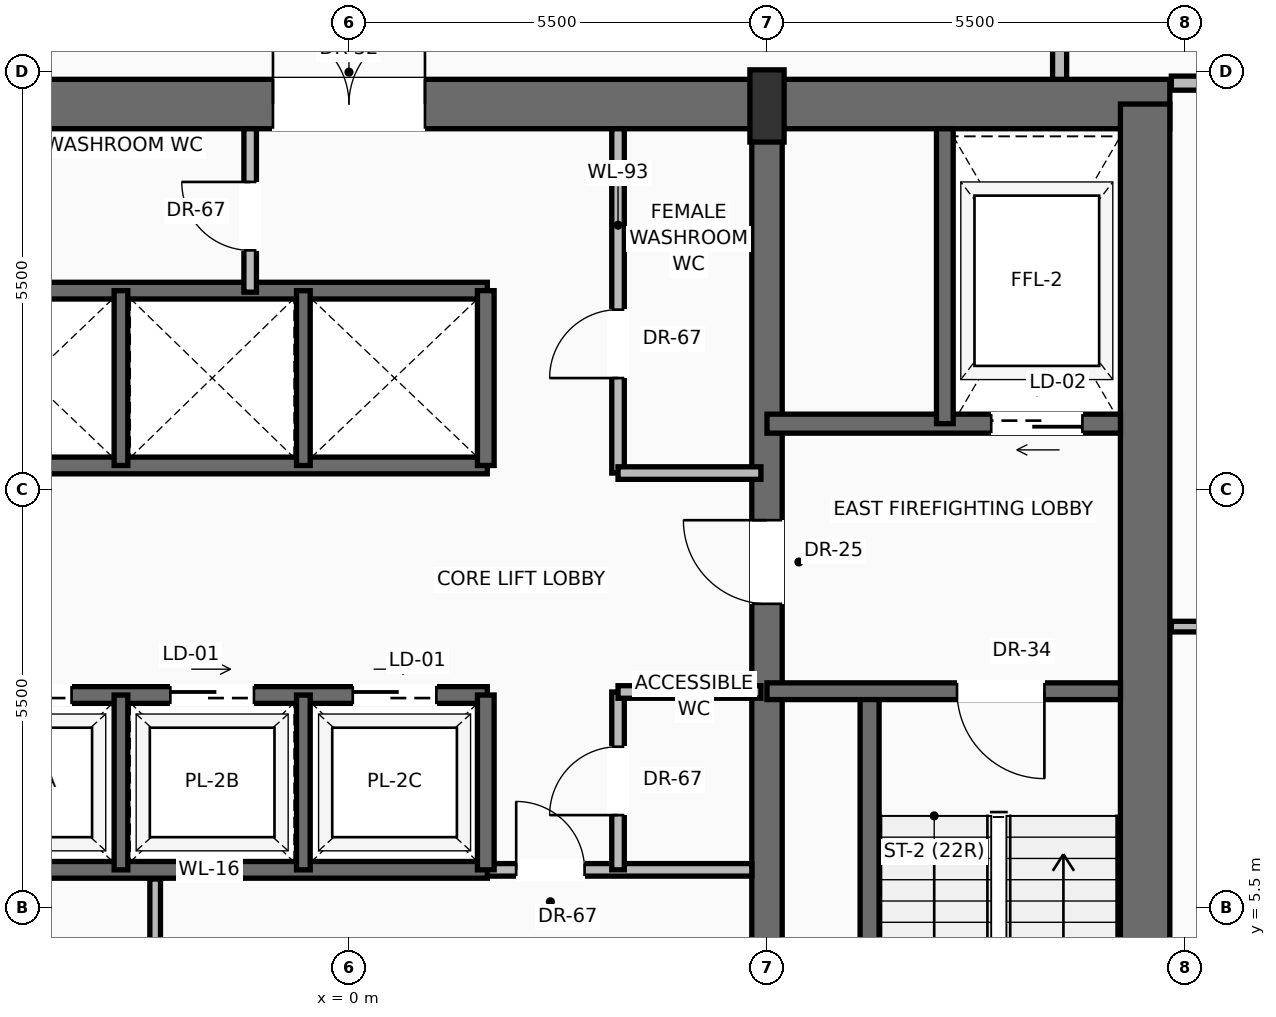
"""IFC4 building model, lengths in metres.
Left out: names, types, materials, properties, quantities, classifications, styles, units other than length and angle.
Written with IfcOpenShell. Run it as: python <this file> out.ifc"""

import sys

from ifc_helpers import new_model, si_unit, direction, frame, frame_2d, origin, origin_2d, place, context, subcontext, project, spatial, rectangle, extrude, source, transform, mapped, element, fill, save


model = new_model("IFC4")
c1 = context("Model", 3, precision=1e-05, world=origin(), true_north=direction((0.0, 1.0)))
c2 = subcontext(c1, "Body", "Model", "MODEL_VIEW")
j1 = project(units=[si_unit("LENGTHUNIT", "METRE"), si_unit("PLANEANGLEUNIT", "RADIAN")], contexts=[c1])
p1 = place(None, origin())
s1 = spatial("IfcSite", under=j1, at=p1, CompositionType="ELEMENT")
p2 = place(p1, origin())
s2 = spatial("IfcBuilding", under=s1, at=p2, CompositionType="ELEMENT")
p3 = place(p2, frame((0.0, 0.0, 158.9)))
s3 = spatial("IfcBuildingStorey", under=s2, at=p3, CompositionType="ELEMENT", Elevation=158.9)
p4 = place(p3, frame((-10.8, 16.075, 0.0), z_axis=(0.0, 0.0, 1.0), x_axis=(1.0, 0.0, 0.0)))
e1 = element("IfcWall", 1, at=p4, inside=s3, PredefinedType="SHEAR", context=c2, shape_type="SweptSolid", body=[
    extrude(rectangle(XDim=21.6, YDim=0.65, at=frame_2d((10.8, 0.0))), origin(), (0.0, 0.0, 1.0), 3.47),
])
p5 = place(p4, frame((3.37, 0.0, 0.0)))
e2 = element("IfcOpeningElement", 2, at=p5, cuts=e1, PredefinedType="OPENING", context=c2, shape_type="SweptSolid", body=[
    extrude(rectangle(XDim=1.3, YDim=2.3, at=frame_2d((0.65, 1.15))), frame((0.0, 0.335, 0.0), z_axis=(0.0, -1.0, 0.0), x_axis=(1.0, 0.0, 0.0)), (0.0, 0.0, 1.0), 0.67),
])
p6 = place(p4, frame((9.8, 0.0, 0.0)))
e3 = element("IfcOpeningElement", 3, at=p6, cuts=e1, PredefinedType="OPENING", context=c2, shape_type="SweptSolid", body=[
    extrude(rectangle(XDim=2.0, YDim=2.4, at=frame_2d((1.0, 1.2))), frame((0.0, 0.335, 0.0), z_axis=(0.0, -1.0, 0.0), x_axis=(1.0, 0.0, 0.0)), (0.0, 0.0, 1.0), 0.67),
])
p7 = place(p3, frame((10.475, 0.525, 0.0), z_axis=(0.0, 0.0, 1.0), x_axis=(0.0, 1.0, 0.0)))
e4 = element("IfcWall", 4, at=p7, inside=s3, PredefinedType="SHEAR", context=c2, shape_type="SweptSolid", body=[
    extrude(rectangle(XDim=15.55, YDim=0.65, at=frame_2d((7.775, 0.0))), origin(), (0.0, 0.0, 1.0), 3.47),
])
p8 = place(p3, frame((5.5, 0.525, 0.0), z_axis=(0.0, 0.0, 1.0), x_axis=(0.0, 1.0, 0.0)))
e5 = element("IfcWall", 5, at=p8, inside=s3, PredefinedType="SHEAR", context=c2, shape_type="SweptSolid", body=[
    extrude(rectangle(XDim=15.55, YDim=0.4, at=frame_2d((7.775, 0.0))), origin(), (0.0, 0.0, 1.0), 3.47),
])
p9 = place(p8, frame((8.975, 0.0, 0.0)))
e6 = element("IfcOpeningElement", 6, at=p9, cuts=e5, PredefinedType="OPENING", context=c2, shape_type="SweptSolid", body=[
    extrude(rectangle(XDim=1.1, YDim=2.2, at=frame_2d((0.55, 1.1))), frame((0.0, 0.21, 0.0), z_axis=(0.0, -1.0, 0.0), x_axis=(1.0, 0.0, 0.0)), (0.0, 0.0, 1.0), 0.42),
])
m1 = source(origin(), c2, "Body", "SweptSolid", [
    extrude(rectangle(XDim=0.45, YDim=0.95, at=origin_2d()), origin(), (0.0, 0.0, 1.0), 3.7),
])
p10 = place(p3, frame((5.5, 16.05, 0.0), z_axis=(0.0, 0.0, 1.0), x_axis=(1.0, 0.0, 0.0)))
e7 = element("IfcColumn", 7, at=p10, inside=s3, PredefinedType="PILASTER", context=c2, shape_type="MappedRepresentation", body=[
    mapped(m1, transform((0.0, 0.0, 0.0), scale=1.0)),
])
p11 = place(p3, frame((6.85, 0.85, 0.0), z_axis=(0.0, 0.0, 1.0), x_axis=(0.0, 1.0, 0.0)))
e8 = element("IfcWall", 8, at=p11, inside=s3, PredefinedType="SOLIDWALL", context=c2, shape_type="SweptSolid", body=[
    extrude(rectangle(XDim=7.5, YDim=0.25, at=frame_2d((3.75, 0.0))), origin(), (0.0, 0.0, 1.0), 3.47),
])
p12 = place(p3, frame((10.15, 8.35, 0.0), z_axis=(0.0, 0.0, 1.0), x_axis=(-1.0, 0.0, 0.0)))
e9 = element("IfcWall", 9, at=p12, inside=s3, PredefinedType="SOLIDWALL", context=c2, shape_type="SweptSolid", body=[
    extrude(rectangle(XDim=4.65, YDim=0.22, at=frame_2d((2.325, 0.0))), origin(), (0.0, 0.0, 1.0), 3.47),
])
p13 = place(p12, frame((1.0, 0.0, 0.0)))
e10 = element("IfcOpeningElement", 10, at=p13, cuts=e9, PredefinedType="OPENING", context=c2, shape_type="SweptSolid", body=[
    extrude(rectangle(XDim=1.15, YDim=2.2, at=frame_2d((0.575, 1.1))), frame((0.0, 0.12, 0.0), z_axis=(0.0, -1.0, 0.0), x_axis=(1.0, 0.0, 0.0)), (0.0, 0.0, 1.0), 0.24),
])
p14 = place(p3, frame((10.15, 11.87, 0.0), z_axis=(0.0, 0.0, 1.0), x_axis=(-1.0, 0.0, 0.0)))
e11 = element("IfcWall", 11, at=p14, inside=s3, PredefinedType="SOLIDWALL", context=c2, shape_type="SweptSolid", body=[
    extrude(rectangle(XDim=4.65, YDim=0.25, at=frame_2d((2.325, 0.0))), origin(), (0.0, 0.0, 1.0), 3.47),
])
p15 = place(p14, frame((0.5, 0.0, 0.0)))
e12 = element("IfcOpeningElement", 12, at=p15, cuts=e11, PredefinedType="OPENING", context=c2, shape_type="SweptSolid", body=[
    extrude(rectangle(XDim=1.2, YDim=2.25, at=frame_2d((0.6, 1.125))), frame((0.0, 0.135, 0.0), z_axis=(0.0, -1.0, 0.0), x_axis=(1.0, 0.0, 0.0)), (0.0, 0.0, 1.0), 0.27),
])
p16 = place(p3, frame((7.84, 11.87, 0.0), z_axis=(0.0, 0.0, 1.0), x_axis=(0.0, 1.0, 0.0)))
e13 = element("IfcWall", 13, at=p16, inside=s3, PredefinedType="SOLIDWALL", context=c2, shape_type="SweptSolid", body=[
    extrude(rectangle(XDim=3.88, YDim=0.22, at=frame_2d((1.94, 0.0))), origin(), (0.0, 0.0, 1.0), 3.47),
])
p17 = place(p3, frame((1.82, 6.0, 0.0), z_axis=(0.0, 0.0, 1.0), x_axis=(1.0, 0.0, 0.0)))
e14 = element("IfcWall", 14, at=p17, inside=s3, PredefinedType="PARTITIONING", context=c2, shape_type="SweptSolid", body=[
    extrude(rectangle(XDim=3.48, YDim=0.165, at=frame_2d((1.74, 0.0))), origin(), (0.0, 0.0, 1.0), 3.462),
])
p18 = place(p17, frame((0.38, 0.0, 0.0)))
e15 = element("IfcOpeningElement", 15, at=p18, cuts=e14, PredefinedType="OPENING", context=c2, shape_type="SweptSolid", body=[
    extrude(rectangle(XDim=0.9, YDim=2.1, at=frame_2d((0.45, 1.05))), frame((0.0, 0.093, 0.0), z_axis=(0.0, -1.0, 0.0), x_axis=(1.0, 0.0, 0.0)), (0.0, 0.0, 1.0), 0.185),
])
p19 = place(p3, frame((-2.55, 0.85, 0.0), z_axis=(0.0, 0.0, 1.0), x_axis=(0.0, 1.0, 0.0)))
e16 = element("IfcWall", 16, at=p19, inside=s3, PredefinedType="PARTITIONING", context=c2, shape_type="SweptSolid", body=[
    extrude(rectangle(XDim=5.03, YDim=0.14, at=frame_2d((2.515, 0.0))), origin(), (0.0, 0.0, 1.0), 3.462),
])
p20 = place(p19, frame((2.1, 0.0, 0.0)))
e17 = element("IfcOpeningElement", 17, at=p20, cuts=e16, PredefinedType="OPENING", context=c2, shape_type="SweptSolid", body=[
    extrude(rectangle(XDim=0.9, YDim=2.1, at=frame_2d((0.45, 1.05))), frame((0.0, 0.08, 0.0), z_axis=(0.0, -1.0, 0.0), x_axis=(1.0, 0.0, 0.0)), (0.0, 0.0, 1.0), 0.16),
])
p21 = place(p3, frame((3.54, 6.0, 0.0), z_axis=(0.0, 0.0, 1.0), x_axis=(0.0, 1.0, 0.0)))
e18 = element("IfcWall", 18, at=p21, inside=s3, PredefinedType="PARTITIONING", context=c2, shape_type="SweptSolid", body=[
    extrude(rectangle(XDim=2.34, YDim=0.165, at=frame_2d((1.17, 0.0))), origin(), (0.0, 0.0, 1.0), 3.462),
])
p22 = place(p21, frame((0.72, 0.0, 0.0)))
e19 = element("IfcOpeningElement", 19, at=p22, cuts=e18, PredefinedType="OPENING", context=c2, shape_type="SweptSolid", body=[
    extrude(rectangle(XDim=0.9, YDim=2.1, at=frame_2d((0.45, 1.05))), frame((0.0, 0.093, 0.0), z_axis=(0.0, -1.0, 0.0), x_axis=(1.0, 0.0, 0.0)), (0.0, 0.0, 1.0), 0.185),
])
p23 = place(p3, frame((3.54, 8.34, 0.0), z_axis=(0.0, 0.0, 1.0), x_axis=(1.0, 0.0, 0.0)))
e20 = element("IfcWall", 20, at=p23, inside=s3, PredefinedType="PARTITIONING", context=c2, shape_type="SweptSolid", body=[
    extrude(rectangle(XDim=1.88, YDim=0.165, at=frame_2d((0.94, 0.0))), origin(), (0.0, 0.0, 1.0), 3.462),
])
p24 = place(p3, frame((-5.5, 6.0, 0.0), z_axis=(0.0, 0.0, 1.0), x_axis=(1.0, 0.0, 0.0)))
e21 = element("IfcWall", 21, at=p24, inside=s3, PredefinedType="SOLIDWALL", context=c2, shape_type="SweptSolid", body=[
    extrude(rectangle(XDim=7.32, YDim=0.22, at=frame_2d((3.66, 0.0))), origin(), (0.0, 0.0, 1.0), 3.47),
])
p25 = place(p3, frame((-5.5, 8.3, 0.0), z_axis=(0.0, 0.0, 1.0), x_axis=(1.0, 0.0, 0.0)))
e22 = element("IfcWall", 22, at=p25, inside=s3, PredefinedType="SOLIDWALL", context=c2, shape_type="SweptSolid", body=[
    extrude(rectangle(XDim=7.32, YDim=0.22, at=frame_2d((3.66, 0.0))), origin(), (0.0, 0.0, 1.0), 3.47),
])
p26 = place(p25, frame((0.75, 0.0, 0.0)))
e23 = element("IfcOpeningElement", 23, at=p26, cuts=e22, PredefinedType="OPENING", context=c2, shape_type="SweptSolid", body=[
    extrude(rectangle(XDim=1.1, YDim=2.2, at=frame_2d((0.55, 1.1))), frame((0.0, 0.12, 0.0), z_axis=(0.0, -1.0, 0.0), x_axis=(1.0, 0.0, 0.0)), (0.0, 0.0, 1.0), 0.24),
])
p27 = place(p25, frame((3.15, 0.0, 0.0)))
e24 = element("IfcOpeningElement", 24, at=p27, cuts=e22, PredefinedType="OPENING", context=c2, shape_type="SweptSolid", body=[
    extrude(rectangle(XDim=1.1, YDim=2.2, at=frame_2d((0.55, 1.1))), frame((0.0, 0.12, 0.0), z_axis=(0.0, -1.0, 0.0), x_axis=(1.0, 0.0, 0.0)), (0.0, 0.0, 1.0), 0.24),
])
p28 = place(p25, frame((5.55, 0.0, 0.0)))
e25 = element("IfcOpeningElement", 25, at=p28, cuts=e22, PredefinedType="OPENING", context=c2, shape_type="SweptSolid", body=[
    extrude(rectangle(XDim=1.1, YDim=2.2, at=frame_2d((0.55, 1.1))), frame((0.0, 0.12, 0.0), z_axis=(0.0, -1.0, 0.0), x_axis=(1.0, 0.0, 0.0)), (0.0, 0.0, 1.0), 0.24),
])
p29 = place(p3, frame((1.8, 6.0, 0.0), z_axis=(0.0, 0.0, 1.0), x_axis=(0.0, 1.0, 0.0)))
e26 = element("IfcWall", 26, at=p29, inside=s3, PredefinedType="SOLIDWALL", context=c2, shape_type="SweptSolid", body=[
    extrude(rectangle(XDim=2.3, YDim=0.22, at=frame_2d((1.15, 0.0))), origin(), (0.0, 0.0, 1.0), 3.47),
])
for number, where, z_axis, x_axis in (
    (27, (-3.0, 6.0, 0.0), (0.0, 0.0, 1.0), (0.0, 1.0, 0.0)),
    (28, (-0.6, 6.0, 0.0), (0.0, 0.0, 1.0), (0.0, 1.0, 0.0)),
):
    element("IfcWall", number, at=place(p3, frame(where, z_axis=z_axis, x_axis=x_axis)), inside=s3, PredefinedType="SOLIDWALL", context=c2, shape_type="SweptSolid", body=[
        extrude(rectangle(XDim=2.3, YDim=0.18, at=frame_2d((1.15, 0.0))), origin(), (0.0, 0.0, 1.0), 3.47),
    ])
for number, where, z_axis, x_axis in (
    (29, (-5.5, 11.32, 0.0), (0.0, 0.0, 1.0), (1.0, 0.0, 0.0)),
    (30, (-5.5, 13.62, 0.0), (0.0, 0.0, 1.0), (1.0, 0.0, 0.0)),
):
    element("IfcWall", number, at=place(p3, frame(where, z_axis=z_axis, x_axis=x_axis)), inside=s3, PredefinedType="SOLIDWALL", context=c2, shape_type="SweptSolid", body=[
        extrude(rectangle(XDim=7.32, YDim=0.22, at=frame_2d((3.66, 0.0))), origin(), (0.0, 0.0, 1.0), 3.47),
    ])
p30 = place(p3, frame((1.8, 11.32, 0.0), z_axis=(0.0, 0.0, 1.0), x_axis=(0.0, 1.0, 0.0)))
e31 = element("IfcWall", 31, at=p30, inside=s3, PredefinedType="SOLIDWALL", context=c2, shape_type="SweptSolid", body=[
    extrude(rectangle(XDim=2.3, YDim=0.22, at=frame_2d((1.15, 0.0))), origin(), (0.0, 0.0, 1.0), 3.47),
])
for number, where, z_axis, x_axis in (
    (32, (-3.0, 11.32, 0.0), (0.0, 0.0, 1.0), (0.0, 1.0, 0.0)),
    (33, (-0.6, 11.32, 0.0), (0.0, 0.0, 1.0), (0.0, 1.0, 0.0)),
):
    element("IfcWall", number, at=place(p3, frame(where, z_axis=z_axis, x_axis=x_axis)), inside=s3, PredefinedType="SOLIDWALL", context=c2, shape_type="SweptSolid", body=[
        extrude(rectangle(XDim=2.3, YDim=0.18, at=frame_2d((1.15, 0.0))), origin(), (0.0, 0.0, 1.0), 3.47),
    ])
p31 = place(p3, frame((-1.3, 13.6, 0.0), z_axis=(0.0, 0.0, 1.0), x_axis=(0.0, 1.0, 0.0)))
e34 = element("IfcWall", 34, at=p31, inside=s3, PredefinedType="PARTITIONING", context=c2, shape_type="SweptSolid", body=[
    extrude(rectangle(XDim=2.15, YDim=0.165, at=frame_2d((1.075, 0.0))), origin(), (0.0, 0.0, 1.0), 3.462),
])
p32 = place(p31, frame((0.55, 0.0, 0.0)))
e35 = element("IfcOpeningElement", 35, at=p32, cuts=e34, PredefinedType="OPENING", context=c2, shape_type="SweptSolid", body=[
    extrude(rectangle(XDim=0.9, YDim=2.1, at=frame_2d((0.45, 1.05))), frame((0.0, 0.093, 0.0), z_axis=(0.0, -1.0, 0.0), x_axis=(1.0, 0.0, 0.0)), (0.0, 0.0, 1.0), 0.185),
])
p33 = place(p3, frame((3.54, 11.22, 0.0), z_axis=(0.0, 0.0, 1.0), x_axis=(0.0, 1.0, 0.0)))
e36 = element("IfcWall", 36, at=p33, inside=s3, PredefinedType="PARTITIONING", context=c2, shape_type="SweptSolid", body=[
    extrude(rectangle(XDim=4.53, YDim=0.165, at=frame_2d((2.265, 0.0))), origin(), (0.0, 0.0, 1.0), 3.462),
])
p34 = place(p33, frame((1.25, 0.0, 0.0)))
e37 = element("IfcOpeningElement", 37, at=p34, cuts=e36, PredefinedType="OPENING", context=c2, shape_type="SweptSolid", body=[
    extrude(rectangle(XDim=0.9, YDim=2.1, at=frame_2d((0.45, 1.05))), frame((0.0, 0.093, 0.0), z_axis=(0.0, -1.0, 0.0), x_axis=(1.0, 0.0, 0.0)), (0.0, 0.0, 1.0), 0.185),
])
p35 = place(p3, frame((3.54, 11.22, 0.0), z_axis=(0.0, 0.0, 1.0), x_axis=(1.0, 0.0, 0.0)))
e38 = element("IfcWall", 38, at=p35, inside=s3, PredefinedType="PARTITIONING", context=c2, shape_type="SweptSolid", body=[
    extrude(rectangle(XDim=1.88, YDim=0.165, at=frame_2d((0.94, 0.0))), origin(), (0.0, 0.0, 1.0), 3.462),
])
p36 = place(p3, frame((9.35, 16.4, 0.0), z_axis=(0.0, 0.0, 1.0), x_axis=(0.0, 1.0, 0.0)))
e39 = element("IfcWall", 39, at=p36, inside=s3, PredefinedType="PARTITIONING", context=c2, shape_type="SweptSolid", body=[
    extrude(rectangle(XDim=7.8, YDim=0.185, at=frame_2d((3.9, 0.0))), origin(), (0.0, 0.0, 1.0), 3.462),
])
p37 = place(p36, frame((3.781, 0.0, 0.0)))
e40 = element("IfcOpeningElement", 40, at=p37, cuts=e39, PredefinedType="OPENING", context=c2, shape_type="SweptSolid", body=[
    extrude(rectangle(XDim=0.95, YDim=2.2, at=frame_2d((0.475, 1.1))), frame((0.0, 0.103, 0.0), z_axis=(0.0, -1.0, 0.0), x_axis=(1.0, 0.0, 0.0)), (0.0, 0.0, 1.0), 0.205),
])
p38 = place(p3, frame((10.82, 16.35, 0.0), z_axis=(0.0, 0.0, 1.0), x_axis=(1.0, 0.0, 0.0)))
e41 = element("IfcWall", 41, at=p38, inside=s3, PredefinedType="PARTITIONING", context=c2, shape_type="SweptSolid", body=[
    extrude(rectangle(XDim=10.417, YDim=0.185, at=frame_2d((5.208, 0.0))), origin(), (0.0, 0.0, 1.0), 3.462),
])
p39 = place(p38, frame((3.273, 0.0, 0.0)))
e42 = element("IfcOpeningElement", 42, at=p39, cuts=e41, PredefinedType="OPENING", context=c2, shape_type="SweptSolid", body=[
    extrude(rectangle(XDim=0.95, YDim=2.2, at=frame_2d((0.475, 1.1))), frame((0.0, 0.103, 0.0), z_axis=(0.0, -1.0, 0.0), x_axis=(1.0, 0.0, 0.0)), (0.0, 0.0, 1.0), 0.205),
])
p40 = place(p3, frame((10.82, 9.2, 0.0), z_axis=(0.0, 0.0, 1.0), x_axis=(1.0, 0.0, 0.0)))
e43 = element("IfcWall", 43, at=p40, inside=s3, PredefinedType="PARTITIONING", context=c2, shape_type="SweptSolid", body=[
    extrude(rectangle(XDim=14.961, YDim=0.14, at=frame_2d((7.481, 0.0))), origin(), (0.0, 0.0, 1.0), 3.462),
])
p41 = place(p40, frame((6.998, 0.0, 0.0)))
e44 = element("IfcOpeningElement", 44, at=p41, cuts=e43, PredefinedType="OPENING", context=c2, shape_type="SweptSolid", body=[
    extrude(rectangle(XDim=0.95, YDim=2.2, at=frame_2d((0.475, 1.1))), frame((0.0, 0.08, 0.0), z_axis=(0.0, -1.0, 0.0), x_axis=(1.0, 0.0, 0.0)), (0.0, 0.0, 1.0), 0.16),
])
m2 = source(origin(), c2, "Body", "SweptSolid", [
    extrude(rectangle(XDim=1.15, YDim=2.2, at=frame_2d((0.575, 1.1))), frame((0.0, 0.025, 0.0), z_axis=(0.0, -1.0, 0.0), x_axis=(1.0, 0.0, 0.0)), (0.0, 0.0, 1.0), 0.05),
])
p42 = place(p13, origin())
e45 = element("IfcDoor", 45, at=p42, inside=s3, OperationType="SINGLE_SWING_LEFT", PredefinedType="DOOR", context=c2, shape_type="MappedRepresentation", body=[
    mapped(m2, transform((0.0, 0.0, 0.0), scale=1.0)),
])
fill(e10, e45)
m3 = source(origin(), c2, "Body", "SweptSolid", [
    extrude(rectangle(XDim=1.1, YDim=2.2, at=frame_2d((0.55, 1.1))), frame((0.0, 0.025, 0.0), z_axis=(0.0, -1.0, 0.0), x_axis=(1.0, 0.0, 0.0)), (0.0, 0.0, 1.0), 0.05),
])
p43 = place(p9, origin())
e46 = element("IfcDoor", 46, at=p43, inside=s3, OperationType="SINGLE_SWING_RIGHT", PredefinedType="DOOR", context=c2, shape_type="MappedRepresentation", body=[
    mapped(m3, transform((0.0, 0.0, 0.0), scale=1.0)),
])
fill(e6, e46)
m4 = source(origin(), c2, "Body", "SweptSolid", [
    extrude(rectangle(XDim=1.2, YDim=2.25, at=frame_2d((0.6, 1.125))), frame((0.0, 0.025, 0.0), z_axis=(0.0, -1.0, 0.0), x_axis=(1.0, 0.0, 0.0)), (0.0, 0.0, 1.0), 0.05),
])
p44 = place(p15, origin())
e47 = element("IfcDoor", 47, at=p44, inside=s3, OperationType="SLIDING_TO_RIGHT", PredefinedType="DOOR", context=c2, shape_type="MappedRepresentation", body=[
    mapped(m4, transform((0.0, 0.0, 0.0), scale=1.0)),
])
fill(e12, e47)
m5 = source(origin(), c2, "Body", "SweptSolid", [
    extrude(rectangle(XDim=2.0, YDim=2.4, at=frame_2d((1.0, 1.2))), frame((0.0, 0.025, 0.0), z_axis=(0.0, -1.0, 0.0), x_axis=(1.0, 0.0, 0.0)), (0.0, 0.0, 1.0), 0.05),
])
p45 = place(p6, origin())
e48 = element("IfcDoor", 48, at=p45, inside=s3, OperationType="DOUBLE_DOOR_SINGLE_SWING", PredefinedType="DOOR", context=c2, shape_type="MappedRepresentation", body=[
    mapped(m5, transform((0.0, 0.0, 0.0), scale=1.0)),
])
fill(e3, e48)
m6 = source(origin(), c2, "Body", "SweptSolid", [
    extrude(rectangle(XDim=0.9, YDim=2.1, at=frame_2d((0.45, 1.05))), frame((0.0, 0.025, 0.0), z_axis=(0.0, -1.0, 0.0), x_axis=(1.0, 0.0, 0.0)), (0.0, 0.0, 1.0), 0.05),
])
p46 = place(p18, origin())
e49 = element("IfcDoor", 49, at=p46, inside=s3, OperationType="SINGLE_SWING_LEFT", PredefinedType="DOOR", context=c2, shape_type="MappedRepresentation", body=[
    mapped(m6, transform((0.0, 0.0, 0.0), scale=1.0)),
])
fill(e15, e49)
p47 = place(p22, origin())
e50 = element("IfcDoor", 50, at=p47, inside=s3, OperationType="SINGLE_SWING_LEFT", PredefinedType="DOOR", context=c2, shape_type="MappedRepresentation", body=[
    mapped(m6, transform((0.0, 0.0, 0.0), scale=1.0)),
])
fill(e19, e50)
m7 = source(origin(), c2, "Body", "SweptSolid", [
    extrude(rectangle(XDim=1.1, YDim=2.2, at=frame_2d((0.55, 1.1))), frame((0.0, 0.025, 0.0), z_axis=(0.0, -1.0, 0.0), x_axis=(1.0, 0.0, 0.0)), (0.0, 0.0, 1.0), 0.05),
])
p48 = place(p26, origin())
e51 = element("IfcDoor", 51, at=p48, inside=s3, OperationType="SLIDING_TO_LEFT", PredefinedType="DOOR", context=c2, shape_type="MappedRepresentation", body=[
    mapped(m7, transform((0.0, 0.0, 0.0), scale=1.0)),
])
fill(e23, e51)
p49 = place(p27, origin())
e52 = element("IfcDoor", 52, at=p49, inside=s3, OperationType="SLIDING_TO_LEFT", PredefinedType="DOOR", context=c2, shape_type="MappedRepresentation", body=[
    mapped(m7, transform((0.0, 0.0, 0.0), scale=1.0)),
])
fill(e24, e52)
p50 = place(p28, origin())
e53 = element("IfcDoor", 53, at=p50, inside=s3, OperationType="SLIDING_TO_LEFT", PredefinedType="DOOR", context=c2, shape_type="MappedRepresentation", body=[
    mapped(m7, transform((0.0, 0.0, 0.0), scale=1.0)),
])
fill(e25, e53)
p51 = place(p32, origin())
e54 = element("IfcDoor", 54, at=p51, inside=s3, OperationType="SINGLE_SWING_RIGHT", PredefinedType="DOOR", context=c2, shape_type="MappedRepresentation", body=[
    mapped(m6, transform((0.0, 0.0, 0.0), scale=1.0)),
])
fill(e35, e54)
p52 = place(p34, origin())
e55 = element("IfcDoor", 55, at=p52, inside=s3, OperationType="SINGLE_SWING_LEFT", PredefinedType="DOOR", context=c2, shape_type="MappedRepresentation", body=[
    mapped(m6, transform((0.0, 0.0, 0.0), scale=1.0)),
])
fill(e37, e55)
save(model, sys.argv[1])
